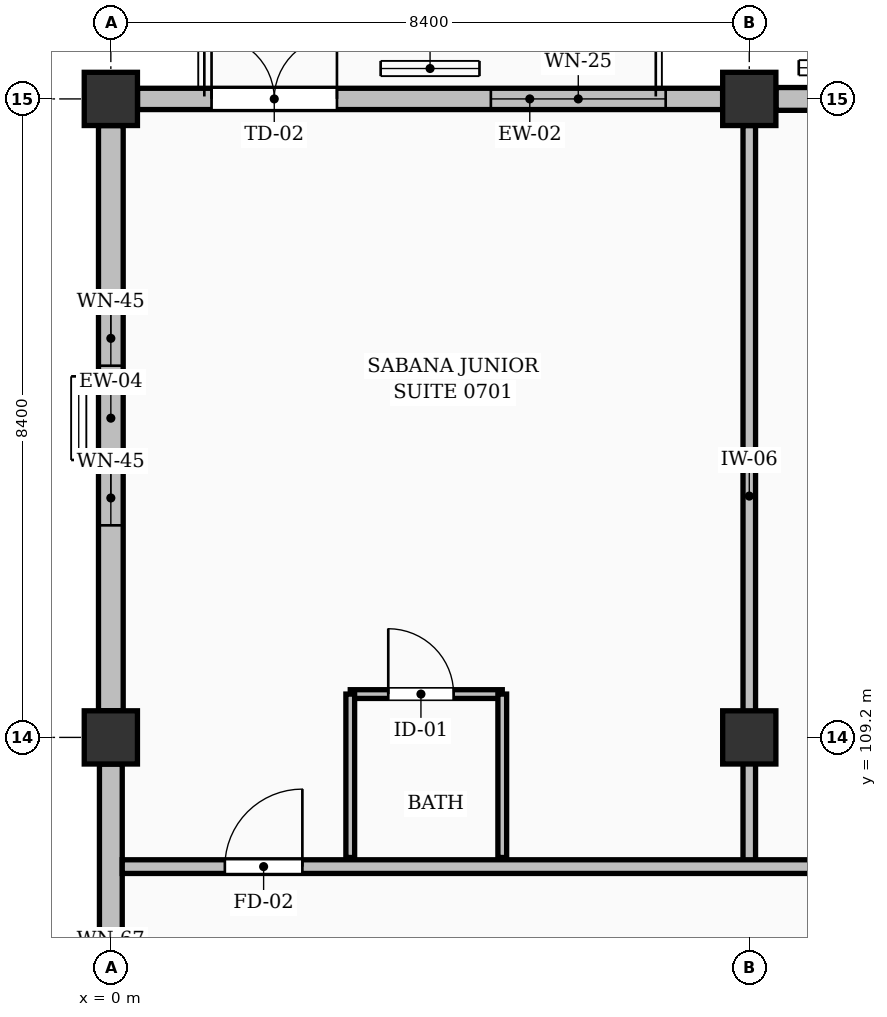
"""IFC4 building model, lengths in metres.
Left out: names, types, materials, properties, quantities, classifications, styles, units other than length and angle.
Written with IfcOpenShell. Run it as: python <this file> out.ifc"""

import sys

from ifc_helpers import new_model, si_unit, direction, frame, frame_2d, origin, origin_2d, place, context, subcontext, project, spatial, rectangle, extrude, element, fill, save


model = new_model("IFC4")
c1 = context("Model", 3, precision=1e-05, world=origin(), true_north=direction((0.0, 1.0)))
c2 = subcontext(c1, "Body", "Model", "MODEL_VIEW")
j1 = project(units=[si_unit("LENGTHUNIT", "METRE"), si_unit("PLANEANGLEUNIT", "RADIAN")], contexts=[c1])
p1 = place(None, origin())
s1 = spatial("IfcSite", under=j1, at=p1, CompositionType="ELEMENT")
p2 = place(p1, origin())
s2 = spatial("IfcBuilding", under=s1, at=p2, CompositionType="ELEMENT")
p3 = place(p2, frame((0.0, 0.0, 25.2)))
s3 = spatial("IfcBuildingStorey", under=s2, at=p3, CompositionType="ELEMENT", Elevation=25.2)
for number, where, z_axis, x_axis in (
    (1, (0.0, 109.2, 0.0), (0.0, 0.0, 1.0), (1.0, 0.0, 0.0)),
    (2, (0.0, 117.6, 0.0), (0.0, 0.0, 1.0), (1.0, 0.0, 0.0)),
    (3, (8.4, 109.2, 0.0), (0.0, 0.0, 1.0), (1.0, 0.0, 0.0)),
    (4, (8.4, 117.6, 0.0), (0.0, 0.0, 1.0), (1.0, 0.0, 0.0)),
):
    element("IfcColumn", number, at=place(p3, frame(where, z_axis=z_axis, x_axis=x_axis)), inside=s3, PredefinedType="COLUMN", context=c2, shape_type="SweptSolid", body=[
        extrude(rectangle(XDim=0.7, YDim=0.7, at=origin_2d()), origin(), (0.0, 0.0, 1.0), 3.36),
    ])
p4 = place(p3, frame((0.351, 117.6, 0.0), z_axis=(0.0, 0.0, 1.0), x_axis=(1.0, 0.0, 0.0)))
e5 = element("IfcWall", 5, at=p4, inside=s3, PredefinedType="SOLIDWALL", context=c2, shape_type="SweptSolid", body=[
    extrude(rectangle(XDim=7.698, YDim=0.28, at=frame_2d((3.849, 0.0))), origin(), (0.0, 0.0, 1.0), 2.414),
])
p5 = place(p4, frame((0.974, 0.0, 0.0)))
e6 = element("IfcOpeningElement", 6, at=p5, cuts=e5, PredefinedType="OPENING", context=c2, shape_type="SweptSolid", body=[
    extrude(rectangle(XDim=1.65, YDim=2.08, at=frame_2d((0.825, 1.04))), frame((0.0, 0.15, 0.0), z_axis=(0.0, -1.0, 0.0), x_axis=(1.0, 0.0, 0.0)), (0.0, 0.0, 1.0), 0.3),
])
p6 = place(p4, frame((4.649, 0.0, 0.25)))
e7 = element("IfcOpeningElement", 7, at=p6, cuts=e5, PredefinedType="OPENING", context=c2, shape_type="SweptSolid", body=[
    extrude(rectangle(XDim=2.3, YDim=1.75, at=frame_2d((1.15, 0.875))), frame((0.0, 0.15, 0.0), z_axis=(0.0, -1.0, 0.0), x_axis=(1.0, 0.0, 0.0)), (0.0, 0.0, 1.0), 0.3),
])
p7 = place(p3, frame((8.751, 117.6, 0.0), z_axis=(0.0, 0.0, 1.0), x_axis=(1.0, 0.0, 0.0)))
e8 = element("IfcWall", 8, at=p7, inside=s3, PredefinedType="SOLIDWALL", context=c2, shape_type="SweptSolid", body=[
    extrude(rectangle(XDim=7.698, YDim=0.3, at=frame_2d((3.849, 0.0))), origin(), (0.0, 0.0, 1.0), 2.414),
])
p8 = place(p7, frame((0.549, 0.0, 0.25)))
e9 = element("IfcOpeningElement", 9, at=p8, cuts=e8, PredefinedType="OPENING", context=c2, shape_type="SweptSolid", body=[
    extrude(rectangle(XDim=2.4, YDim=1.75, at=frame_2d((1.2, 0.875))), frame((0.0, 0.16, 0.0), z_axis=(0.0, -1.0, 0.0), x_axis=(1.0, 0.0, 0.0)), (0.0, 0.0, 1.0), 0.32),
])
p9 = place(p7, frame((4.789, 0.0, 0.25)))
e10 = element("IfcOpeningElement", 10, at=p9, cuts=e8, PredefinedType="OPENING", context=c2, shape_type="SweptSolid", body=[
    extrude(rectangle(XDim=2.32, YDim=1.9, at=frame_2d((1.16, 0.95))), frame((0.0, 0.16, 0.0), z_axis=(0.0, -1.0, 0.0), x_axis=(1.0, 0.0, 0.0)), (0.0, 0.0, 1.0), 0.32),
])
p10 = place(p3, frame((0.0, 101.151, 0.0), z_axis=(0.0, 0.0, 1.0), x_axis=(0.0, 1.0, 0.0)))
e11 = element("IfcWall", 11, at=p10, inside=s3, PredefinedType="SOLIDWALL", context=c2, shape_type="SweptSolid", body=[
    extrude(rectangle(XDim=7.698, YDim=0.3, at=frame_2d((3.849, 0.0))), origin(), (0.0, 0.0, 1.0), 2.414),
])
p11 = place(p10, frame((2.374, 0.0, 0.3)))
e12 = element("IfcOpeningElement", 12, at=p11, cuts=e11, PredefinedType="OPENING", context=c2, shape_type="SweptSolid", body=[
    extrude(rectangle(XDim=0.85, YDim=1.9, at=frame_2d((0.425, 0.95))), frame((0.0, 0.16, 0.0), z_axis=(0.0, -1.0, 0.0), x_axis=(1.0, 0.0, 0.0)), (0.0, 0.0, 1.0), 0.32),
])
p12 = place(p10, frame((4.474, 0.0, 0.3)))
e13 = element("IfcOpeningElement", 13, at=p12, cuts=e11, PredefinedType="OPENING", context=c2, shape_type="SweptSolid", body=[
    extrude(rectangle(XDim=0.85, YDim=1.9, at=frame_2d((0.425, 0.95))), frame((0.0, 0.16, 0.0), z_axis=(0.0, -1.0, 0.0), x_axis=(1.0, 0.0, 0.0)), (0.0, 0.0, 1.0), 0.32),
])
p13 = place(p3, frame((0.0, 109.551, 0.0), z_axis=(0.0, 0.0, 1.0), x_axis=(0.0, 1.0, 0.0)))
e14 = element("IfcWall", 14, at=p13, inside=s3, PredefinedType="SOLIDWALL", context=c2, shape_type="SweptSolid", body=[
    extrude(rectangle(XDim=7.698, YDim=0.325, at=frame_2d((3.849, 0.0))), origin(), (0.0, 0.0, 1.0), 3.12),
])
p14 = place(p13, frame((2.439, 0.0, 0.3)))
e15 = element("IfcOpeningElement", 15, at=p14, cuts=e14, PredefinedType="OPENING", context=c2, shape_type="SweptSolid", body=[
    extrude(rectangle(XDim=0.72, YDim=1.85, at=frame_2d((0.36, 0.925))), frame((0.0, 0.172, 0.0), z_axis=(0.0, -1.0, 0.0), x_axis=(1.0, 0.0, 0.0)), (0.0, 0.0, 1.0), 0.345),
])
p15 = place(p13, frame((4.539, 0.0, 0.3)))
e16 = element("IfcOpeningElement", 16, at=p15, cuts=e14, PredefinedType="OPENING", context=c2, shape_type="SweptSolid", body=[
    extrude(rectangle(XDim=0.72, YDim=1.85, at=frame_2d((0.36, 0.925))), frame((0.0, 0.172, 0.0), z_axis=(0.0, -1.0, 0.0), x_axis=(1.0, 0.0, 0.0)), (0.0, 0.0, 1.0), 0.345),
])
p16 = place(p3, frame((3.15, 109.77, 0.0), z_axis=(0.0, 0.0, 1.0), x_axis=(1.0, 0.0, 0.0)))
e17 = element("IfcWall", 17, at=p16, inside=s3, PredefinedType="PARTITIONING", context=c2, shape_type="SweptSolid", body=[
    extrude(rectangle(XDim=2.0, YDim=0.115, at=frame_2d((1.0, 0.0))), origin(), (0.0, 0.0, 1.0), 3.12),
])
p17 = place(p16, frame((0.5, 0.0, 0.0)))
e18 = element("IfcOpeningElement", 18, at=p17, cuts=e17, PredefinedType="OPENING", context=c2, shape_type="SweptSolid", body=[
    extrude(rectangle(XDim=0.86, YDim=2.05, at=frame_2d((0.43, 1.025))), frame((0.0, 0.067, 0.0), z_axis=(0.0, -1.0, 0.0), x_axis=(1.0, 0.0, 0.0)), (0.0, 0.0, 1.0), 0.135),
])
for number, where, z_axis, x_axis in (
    (19, (3.15, 107.62, 0.0), (0.0, 0.0, 1.0), (0.0, 1.0, 0.0)),
    (20, (5.15, 107.62, 0.0), (0.0, 0.0, 1.0), (0.0, 1.0, 0.0)),
):
    element("IfcWall", number, at=place(p3, frame(where, z_axis=z_axis, x_axis=x_axis)), inside=s3, PredefinedType="PARTITIONING", context=c2, shape_type="SweptSolid", body=[
        extrude(rectangle(XDim=2.15, YDim=0.115, at=frame_2d((1.075, 0.0))), origin(), (0.0, 0.0, 1.0), 3.12),
    ])
p18 = place(p3, frame((8.4, 107.5, 0.0), z_axis=(0.0, 0.0, 1.0), x_axis=(0.0, 1.0, 0.0)))
e21 = element("IfcWall", 21, at=p18, inside=s3, PredefinedType="PARTITIONING", context=c2, shape_type="SweptSolid", body=[
    extrude(rectangle(XDim=9.75, YDim=0.165, at=frame_2d((4.875, 0.0))), origin(), (0.0, 0.0, 1.0), 2.013),
])
p19 = place(p3, frame((0.15, 107.5, 0.0), z_axis=(0.0, 0.0, 1.0), x_axis=(1.0, 0.0, 0.0)))
e22 = element("IfcWall", 22, at=p19, inside=s3, PredefinedType="PARTITIONING", context=c2, shape_type="SweptSolid", body=[
    extrude(rectangle(XDim=34.22, YDim=0.18, at=frame_2d((17.11, 0.0))), origin(), (0.0, 0.0, 1.0), 3.12),
])
p20 = place(p19, frame((1.35, 0.0, 0.0)))
e23 = element("IfcOpeningElement", 23, at=p20, cuts=e22, PredefinedType="OPENING", context=c2, shape_type="SweptSolid", body=[
    extrude(rectangle(XDim=1.02, YDim=2.15, at=frame_2d((0.51, 1.075))), frame((0.0, 0.1, 0.0), z_axis=(0.0, -1.0, 0.0), x_axis=(1.0, 0.0, 0.0)), (0.0, 0.0, 1.0), 0.2),
])
p21 = place(p19, frame((9.62, 0.0, 0.0)))
e24 = element("IfcOpeningElement", 24, at=p21, cuts=e22, PredefinedType="OPENING", context=c2, shape_type="SweptSolid", body=[
    extrude(rectangle(XDim=0.96, YDim=2.15, at=frame_2d((0.48, 1.075))), frame((0.0, 0.1, 0.0), z_axis=(0.0, -1.0, 0.0), x_axis=(1.0, 0.0, 0.0)), (0.0, 0.0, 1.0), 0.2),
])
p22 = place(p19, frame((14.28, 0.0, 0.0)))
e25 = element("IfcOpeningElement", 25, at=p22, cuts=e22, PredefinedType="OPENING", context=c2, shape_type="SweptSolid", body=[
    extrude(rectangle(XDim=0.96, YDim=2.15, at=frame_2d((0.48, 1.075))), frame((0.0, 0.1, 0.0), z_axis=(0.0, -1.0, 0.0), x_axis=(1.0, 0.0, 0.0)), (0.0, 0.0, 1.0), 0.2),
])
p23 = place(p19, frame((18.02, 0.0, 0.0)))
e26 = element("IfcOpeningElement", 26, at=p23, cuts=e22, PredefinedType="OPENING", context=c2, shape_type="SweptSolid", body=[
    extrude(rectangle(XDim=0.96, YDim=2.15, at=frame_2d((0.48, 1.075))), frame((0.0, 0.1, 0.0), z_axis=(0.0, -1.0, 0.0), x_axis=(1.0, 0.0, 0.0)), (0.0, 0.0, 1.0), 0.2),
])
p24 = place(p19, frame((22.68, 0.0, 0.0)))
e27 = element("IfcOpeningElement", 27, at=p24, cuts=e22, PredefinedType="OPENING", context=c2, shape_type="SweptSolid", body=[
    extrude(rectangle(XDim=0.96, YDim=2.15, at=frame_2d((0.48, 1.075))), frame((0.0, 0.1, 0.0), z_axis=(0.0, -1.0, 0.0), x_axis=(1.0, 0.0, 0.0)), (0.0, 0.0, 1.0), 0.2),
])
p25 = place(p19, frame((26.42, 0.0, 0.0)))
e28 = element("IfcOpeningElement", 28, at=p25, cuts=e22, PredefinedType="OPENING", context=c2, shape_type="SweptSolid", body=[
    extrude(rectangle(XDim=0.96, YDim=2.15, at=frame_2d((0.48, 1.075))), frame((0.0, 0.1, 0.0), z_axis=(0.0, -1.0, 0.0), x_axis=(1.0, 0.0, 0.0)), (0.0, 0.0, 1.0), 0.2),
])
p26 = place(p19, frame((31.08, 0.0, 0.0)))
e29 = element("IfcOpeningElement", 29, at=p26, cuts=e22, PredefinedType="OPENING", context=c2, shape_type="SweptSolid", body=[
    extrude(rectangle(XDim=0.96, YDim=2.15, at=frame_2d((0.48, 1.075))), frame((0.0, 0.1, 0.0), z_axis=(0.0, -1.0, 0.0), x_axis=(1.0, 0.0, 0.0)), (0.0, 0.0, 1.0), 0.2),
])
p27 = place(p5, origin())
e30 = element("IfcDoor", 30, at=p27, inside=s3, OperationType="DOUBLE_DOOR_SINGLE_SWING", PredefinedType="DOOR", context=c2, shape_type="SweptSolid", body=[
    extrude(rectangle(XDim=1.65, YDim=2.08, at=frame_2d((0.825, 1.04))), frame((0.0, 0.025, 0.0), z_axis=(0.0, -1.0, 0.0), x_axis=(1.0, 0.0, 0.0)), (0.0, 0.0, 1.0), 0.05),
])
fill(e6, e30)
p28 = place(p6, origin())
e31 = element("IfcWindow", 31, at=p28, inside=s3, PartitioningType="DOUBLE_PANEL_VERTICAL", PredefinedType="WINDOW", context=c2, shape_type="SweptSolid", body=[
    extrude(rectangle(XDim=2.3, YDim=1.75, at=frame_2d((1.15, 0.875))), frame((0.0, 0.03, 0.0), z_axis=(0.0, -1.0, 0.0), x_axis=(1.0, 0.0, 0.0)), (0.0, 0.0, 1.0), 0.06),
])
fill(e7, e31)
p29 = place(p14, origin())
e32 = element("IfcWindow", 32, at=p29, inside=s3, PartitioningType="SINGLE_PANEL", PredefinedType="WINDOW", context=c2, shape_type="SweptSolid", body=[
    extrude(rectangle(XDim=0.72, YDim=1.85, at=frame_2d((0.36, 0.925))), frame((0.0, 0.03, 0.0), z_axis=(0.0, -1.0, 0.0), x_axis=(1.0, 0.0, 0.0)), (0.0, 0.0, 1.0), 0.06),
])
fill(e15, e32)
p30 = place(p15, origin())
e33 = element("IfcWindow", 33, at=p30, inside=s3, PartitioningType="SINGLE_PANEL", PredefinedType="WINDOW", context=c2, shape_type="SweptSolid", body=[
    extrude(rectangle(XDim=0.72, YDim=1.85, at=frame_2d((0.36, 0.925))), frame((0.0, 0.03, 0.0), z_axis=(0.0, -1.0, 0.0), x_axis=(1.0, 0.0, 0.0)), (0.0, 0.0, 1.0), 0.06),
])
fill(e16, e33)
p31 = place(p17, origin())
e34 = element("IfcDoor", 34, at=p31, inside=s3, OperationType="SINGLE_SWING_LEFT", PredefinedType="DOOR", context=c2, shape_type="SweptSolid", body=[
    extrude(rectangle(XDim=0.86, YDim=2.05, at=frame_2d((0.43, 1.025))), frame((0.0, 0.025, 0.0), z_axis=(0.0, -1.0, 0.0), x_axis=(1.0, 0.0, 0.0)), (0.0, 0.0, 1.0), 0.05),
])
fill(e18, e34)
p32 = place(p20, origin())
e35 = element("IfcDoor", 35, at=p32, inside=s3, OperationType="SINGLE_SWING_RIGHT", PredefinedType="DOOR", context=c2, shape_type="SweptSolid", body=[
    extrude(rectangle(XDim=1.02, YDim=2.15, at=frame_2d((0.51, 1.075))), frame((0.0, 0.025, 0.0), z_axis=(0.0, -1.0, 0.0), x_axis=(1.0, 0.0, 0.0)), (0.0, 0.0, 1.0), 0.05),
])
fill(e23, e35)
save(model, sys.argv[1])
